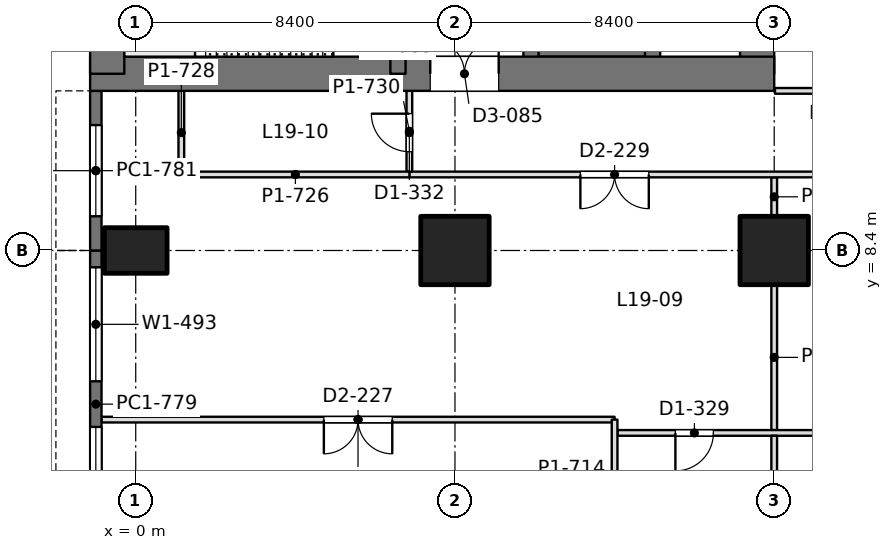
"""IFC4 building model, lengths in metres.
Left out: names, types, materials, properties, quantities, classifications, styles, units other than length and angle.
Written with IfcOpenShell. Run it as: python <this file> out.ifc"""

import sys

from ifc_helpers import new_model, si_unit, direction, frame, frame_2d, origin, origin_2d, place, context, subcontext, project, spatial, rectangle, extrude, element, fill, save


model = new_model("IFC4")
c1 = context("Model", 3, precision=1e-05, world=origin(), true_north=direction((0.0, 1.0)))
c2 = subcontext(c1, "Body", "Model", "MODEL_VIEW")
j1 = project(units=[si_unit("LENGTHUNIT", "METRE"), si_unit("PLANEANGLEUNIT", "RADIAN")], contexts=[c1])
p1 = place(None, origin())
s1 = spatial("IfcSite", under=j1, at=p1, CompositionType="ELEMENT")
p2 = place(p1, origin())
s2 = spatial("IfcBuilding", under=s1, at=p2, CompositionType="ELEMENT")
p3 = place(p2, frame((0.0, 0.0, 86.4)))
s3 = spatial("IfcBuildingStorey", under=s2, at=p3, CompositionType="ELEMENT", Elevation=86.4)
p4 = place(p3, frame((0.0, 8.4, 0.0), z_axis=(0.0, 0.0, 1.0), x_axis=(0.0, 1.0, 0.0)))
e1 = element("IfcColumn", 1, at=p4, inside=s3, PredefinedType="COLUMN", context=c2, shape_type="SweptSolid", body=[
    extrude(rectangle(XDim=1.2, YDim=1.65, at=origin_2d()), origin(), (0.0, 0.0, 1.0), 4.5),
])
for number, where, z_axis, x_axis in (
    (2, (8.4, 8.4, 0.0), (0.0, 0.0, 1.0), (1.0, 0.0, 0.0)),
    (3, (16.8, 8.4, 0.0), (0.0, 0.0, 1.0), (1.0, 0.0, 0.0)),
):
    element("IfcColumn", number, at=place(p3, frame(where, z_axis=z_axis, x_axis=x_axis)), inside=s3, PredefinedType="COLUMN", context=c2, shape_type="SweptSolid", body=[
        extrude(rectangle(XDim=1.8, YDim=1.8, at=origin_2d()), origin(), (0.0, 0.0, 1.0), 4.5),
    ])
p5 = place(p3, frame((-1.2, 13.05, 0.0), z_axis=(0.0, 0.0, 1.0), x_axis=(1.0, 0.0, 0.0)))
e4 = element("IfcWall", 4, at=p5, inside=s3, PredefinedType="SHEAR", context=c2, shape_type="SweptSolid", body=[
    extrude(rectangle(XDim=18.0, YDim=0.9, at=frame_2d((9.0, 0.0))), origin(), (0.0, 0.0, 1.0), 4.5),
])
p6 = place(p5, frame((8.95, 0.0, 0.0)))
e5 = element("IfcOpeningElement", 5, at=p6, cuts=e4, PredefinedType="OPENING", context=c2, shape_type="SweptSolid", body=[
    extrude(rectangle(XDim=1.8, YDim=2.4, at=frame_2d((0.9, 1.2))), frame((0.0, 0.46, 0.0), z_axis=(0.0, -1.0, 0.0), x_axis=(1.0, 0.0, 0.0)), (0.0, 0.0, 1.0), 0.92),
])
for number, where, z_axis, x_axis in (
    (6, (-0.75, 13.05, 0.0), (0.0, 0.0, 1.0), (0.0, 1.0, 0.0)),
    (7, (16.35, 13.05, 0.0), (0.0, 0.0, 1.0), (0.0, 1.0, 0.0)),
):
    element("IfcWall", number, at=place(p3, frame(where, z_axis=z_axis, x_axis=x_axis)), inside=s3, PredefinedType="SHEAR", context=c2, shape_type="SweptSolid", body=[
        extrude(rectangle(XDim=24.3, YDim=0.9, at=frame_2d((12.15, 0.0))), origin(), (0.0, 0.0, 1.0), 4.5),
    ])
p7 = place(p3, frame((6.9, 13.05, 0.0), z_axis=(0.0, 0.0, 1.0), x_axis=(0.0, 1.0, 0.0)))
e8 = element("IfcWall", 8, at=p7, inside=s3, PredefinedType="SHEAR", context=c2, shape_type="SweptSolid", body=[
    extrude(rectangle(XDim=24.3, YDim=0.4, at=frame_2d((12.15, 0.0))), origin(), (0.0, 0.0, 1.0), 4.5),
])
p8 = place(p7, frame((1.3, 0.0, 0.0)))
e9 = element("IfcOpeningElement", 9, at=p8, cuts=e8, PredefinedType="OPENING", context=c2, shape_type="SweptSolid", body=[
    extrude(rectangle(XDim=1.0, YDim=2.2, at=frame_2d((0.5, 1.1))), frame((0.0, 0.21, 0.0), z_axis=(0.0, -1.0, 0.0), x_axis=(1.0, 0.0, 0.0)), (0.0, 0.0, 1.0), 0.42),
])
p9 = place(p7, frame((22.0, 0.0, 0.0)))
e10 = element("IfcOpeningElement", 10, at=p9, cuts=e8, PredefinedType="OPENING", context=c2, shape_type="SweptSolid", body=[
    extrude(rectangle(XDim=1.0, YDim=2.2, at=frame_2d((0.5, 1.1))), frame((0.0, 0.21, 0.0), z_axis=(0.0, -1.0, 0.0), x_axis=(1.0, 0.0, 0.0)), (0.0, 0.0, 1.0), 0.42),
])
p10 = place(p7, frame((5.55, 0.0, 0.0)))
e11 = element("IfcOpeningElement", 11, at=p10, cuts=e8, PredefinedType="OPENING", context=c2, shape_type="SweptSolid", body=[
    extrude(rectangle(XDim=1.0, YDim=2.2, at=frame_2d((0.5, 1.1))), frame((0.0, 0.21, 0.0), z_axis=(0.0, -1.0, 0.0), x_axis=(1.0, 0.0, 0.0)), (0.0, 0.0, 1.0), 0.42),
])
p11 = place(p7, frame((9.55, 0.0, 0.0)))
e12 = element("IfcOpeningElement", 12, at=p11, cuts=e8, PredefinedType="OPENING", context=c2, shape_type="SweptSolid", body=[
    extrude(rectangle(XDim=1.0, YDim=2.2, at=frame_2d((0.5, 1.1))), frame((0.0, 0.21, 0.0), z_axis=(0.0, -1.0, 0.0), x_axis=(1.0, 0.0, 0.0)), (0.0, 0.0, 1.0), 0.42),
])
p12 = place(p7, frame((12.8, 0.0, 0.0)))
e13 = element("IfcOpeningElement", 13, at=p12, cuts=e8, PredefinedType="OPENING", context=c2, shape_type="SweptSolid", body=[
    extrude(rectangle(XDim=1.1, YDim=2.2, at=frame_2d((0.55, 1.1))), frame((0.0, 0.21, 0.0), z_axis=(0.0, -1.0, 0.0), x_axis=(1.0, 0.0, 0.0)), (0.0, 0.0, 1.0), 0.42),
])
p13 = place(p7, frame((15.538, 0.0, 0.0)))
e14 = element("IfcOpeningElement", 14, at=p13, cuts=e8, PredefinedType="OPENING", context=c2, shape_type="SweptSolid", body=[
    extrude(rectangle(XDim=1.1, YDim=2.2, at=frame_2d((0.55, 1.1))), frame((0.0, 0.21, 0.0), z_axis=(0.0, -1.0, 0.0), x_axis=(1.0, 0.0, 0.0)), (0.0, 0.0, 1.0), 0.42),
])
p14 = place(p7, frame((18.262, 0.0, 0.0)))
e15 = element("IfcOpeningElement", 15, at=p14, cuts=e8, PredefinedType="OPENING", context=c2, shape_type="SweptSolid", body=[
    extrude(rectangle(XDim=1.1, YDim=2.2, at=frame_2d((0.55, 1.1))), frame((0.0, 0.21, 0.0), z_axis=(0.0, -1.0, 0.0), x_axis=(1.0, 0.0, 0.0)), (0.0, 0.0, 1.0), 0.42),
])
p15 = place(p3, frame((10.4, 13.05, 0.0), z_axis=(0.0, 0.0, 1.0), x_axis=(0.0, 1.0, 0.0)))
e16 = element("IfcWall", 16, at=p15, inside=s3, PredefinedType="SHEAR", context=c2, shape_type="SweptSolid", body=[
    extrude(rectangle(XDim=24.3, YDim=0.4, at=frame_2d((12.15, 0.0))), origin(), (0.0, 0.0, 1.0), 4.5),
])
p16 = place(p15, frame((1.5, 0.0, 0.0)))
e17 = element("IfcOpeningElement", 17, at=p16, cuts=e16, PredefinedType="OPENING", context=c2, shape_type="SweptSolid", body=[
    extrude(rectangle(XDim=1.1, YDim=2.2, at=frame_2d((0.55, 1.1))), frame((0.0, 0.21, 0.0), z_axis=(0.0, -1.0, 0.0), x_axis=(1.0, 0.0, 0.0)), (0.0, 0.0, 1.0), 0.42),
])
p17 = place(p15, frame((4.35, 0.0, 0.0)))
e18 = element("IfcOpeningElement", 18, at=p17, cuts=e16, PredefinedType="OPENING", context=c2, shape_type="SweptSolid", body=[
    extrude(rectangle(XDim=1.1, YDim=2.2, at=frame_2d((0.55, 1.1))), frame((0.0, 0.21, 0.0), z_axis=(0.0, -1.0, 0.0), x_axis=(1.0, 0.0, 0.0)), (0.0, 0.0, 1.0), 0.42),
])
p18 = place(p15, frame((7.2, 0.0, 0.0)))
e19 = element("IfcOpeningElement", 19, at=p18, cuts=e16, PredefinedType="OPENING", context=c2, shape_type="SweptSolid", body=[
    extrude(rectangle(XDim=1.1, YDim=2.2, at=frame_2d((0.55, 1.1))), frame((0.0, 0.21, 0.0), z_axis=(0.0, -1.0, 0.0), x_axis=(1.0, 0.0, 0.0)), (0.0, 0.0, 1.0), 0.42),
])
p19 = place(p15, frame((21.45, 0.0, 0.0)))
e20 = element("IfcOpeningElement", 20, at=p19, cuts=e16, PredefinedType="OPENING", context=c2, shape_type="SweptSolid", body=[
    extrude(rectangle(XDim=1.1, YDim=2.2, at=frame_2d((0.55, 1.1))), frame((0.0, 0.21, 0.0), z_axis=(0.0, -1.0, 0.0), x_axis=(1.0, 0.0, 0.0)), (0.0, 0.0, 1.0), 0.42),
])
p20 = place(p3, frame((13.6, 13.05, 0.0), z_axis=(0.0, 0.0, 1.0), x_axis=(0.0, 1.0, 0.0)))
e21 = element("IfcWall", 21, at=p20, inside=s3, PredefinedType="SHEAR", context=c2, shape_type="SweptSolid", body=[
    extrude(rectangle(XDim=24.3, YDim=0.4, at=frame_2d((12.15, 0.0))), origin(), (0.0, 0.0, 1.0), 4.5),
])
p21 = place(p3, frame((10.4, 13.65, 0.0), z_axis=(0.0, 0.0, 1.0), x_axis=(1.0, 0.0, 0.0)))
e22 = element("IfcWall", 22, at=p21, inside=s3, PredefinedType="SHEAR", context=c2, shape_type="SweptSolid", body=[
    extrude(rectangle(XDim=3.2, YDim=0.3, at=frame_2d((1.6, 0.0))), origin(), (0.0, 0.0, 1.0), 4.5),
])
p22 = place(p3, frame((-1.05, 0.315, 0.0), z_axis=(0.0, 0.0, 1.0), x_axis=(0.0, 1.0, 0.0)))
e23 = element("IfcWall", 23, at=p22, inside=s3, PredefinedType="SOLIDWALL", context=c2, shape_type="SweptSolid", body=[
    extrude(rectangle(XDim=8.085, YDim=0.3, at=frame_2d((4.042, 0.0))), origin(), (0.0, 0.0, 1.0), 4.3),
])
p23 = place(p22, frame((0.443, 0.0, 0.9)))
e24 = element("IfcOpeningElement", 24, at=p23, cuts=e23, PredefinedType="OPENING", context=c2, shape_type="SweptSolid", body=[
    extrude(rectangle(XDim=3.0, YDim=1.9, at=frame_2d((1.5, 0.95))), frame((0.0, 0.16, 0.0), z_axis=(0.0, -1.0, 0.0), x_axis=(1.0, 0.0, 0.0)), (0.0, 0.0, 1.0), 0.32),
])
p24 = place(p22, frame((4.643, 0.0, 0.9)))
e25 = element("IfcOpeningElement", 25, at=p24, cuts=e23, PredefinedType="OPENING", context=c2, shape_type="SweptSolid", body=[
    extrude(rectangle(XDim=3.0, YDim=1.9, at=frame_2d((1.5, 0.95))), frame((0.0, 0.16, 0.0), z_axis=(0.0, -1.0, 0.0), x_axis=(1.0, 0.0, 0.0)), (0.0, 0.0, 1.0), 0.32),
])
p25 = place(p3, frame((-1.05, 8.4, 0.0), z_axis=(0.0, 0.0, 1.0), x_axis=(0.0, 1.0, 0.0)))
e26 = element("IfcWall", 26, at=p25, inside=s3, PredefinedType="SOLIDWALL", context=c2, shape_type="SweptSolid", body=[
    extrude(rectangle(XDim=4.2, YDim=0.3, at=frame_2d((2.1, 0.0))), origin(), (0.0, 0.0, 1.0), 4.3),
])
p26 = place(p25, frame((0.9, 0.0, 0.9)))
e27 = element("IfcOpeningElement", 27, at=p26, cuts=e26, PredefinedType="OPENING", context=c2, shape_type="SweptSolid", body=[
    extrude(rectangle(XDim=2.4, YDim=1.9, at=frame_2d((1.2, 0.95))), frame((0.0, 0.16, 0.0), z_axis=(0.0, -1.0, 0.0), x_axis=(1.0, 0.0, 0.0)), (0.0, 0.0, 1.0), 0.32),
])
p27 = place(p3, frame((-0.902, 3.95, 0.0), z_axis=(0.0, 0.0, 1.0), x_axis=(1.0, 0.0, 0.0)))
e28 = element("IfcWall", 28, at=p27, inside=s3, PredefinedType="PARTITIONING", context=c2, shape_type="SweptSolid", body=[
    extrude(rectangle(XDim=13.502, YDim=0.15, at=frame_2d((6.751, 0.0))), origin(), (0.0, 0.0, 1.0), 3.6),
])
p28 = place(p27, frame((5.852, 0.0, 0.0)))
e29 = element("IfcOpeningElement", 29, at=p28, cuts=e28, PredefinedType="OPENING", context=c2, shape_type="SweptSolid", body=[
    extrude(rectangle(XDim=1.8, YDim=2.2, at=frame_2d((0.9, 1.1))), frame((0.0, 0.085, 0.0), z_axis=(0.0, -1.0, 0.0), x_axis=(1.0, 0.0, 0.0)), (0.0, 0.0, 1.0), 0.17),
])
p29 = place(p3, frame((12.674, 3.6, 0.0), z_axis=(0.0, 0.0, 1.0), x_axis=(1.0, 0.0, 0.0)))
e30 = element("IfcWall", 30, at=p29, inside=s3, PredefinedType="PARTITIONING", context=c2, shape_type="SweptSolid", body=[
    extrude(rectangle(XDim=12.526, YDim=0.15, at=frame_2d((6.263, 0.0))), origin(), (0.0, 0.0, 1.0), 3.6),
])
p30 = place(p29, frame((1.526, 0.0, 0.0)))
e31 = element("IfcOpeningElement", 31, at=p30, cuts=e30, PredefinedType="OPENING", context=c2, shape_type="SweptSolid", body=[
    extrude(rectangle(XDim=1.0, YDim=2.2, at=frame_2d((0.5, 1.1))), frame((0.0, 0.085, 0.0), z_axis=(0.0, -1.0, 0.0), x_axis=(1.0, 0.0, 0.0)), (0.0, 0.0, 1.0), 0.17),
])
p31 = place(p29, frame((5.726, 0.0, 0.0)))
e32 = element("IfcOpeningElement", 32, at=p31, cuts=e30, PredefinedType="OPENING", context=c2, shape_type="SweptSolid", body=[
    extrude(rectangle(XDim=1.0, YDim=2.2, at=frame_2d((0.5, 1.1))), frame((0.0, 0.085, 0.0), z_axis=(0.0, -1.0, 0.0), x_axis=(1.0, 0.0, 0.0)), (0.0, 0.0, 1.0), 0.17),
])
p32 = place(p29, frame((9.926, 0.0, 0.0)))
e33 = element("IfcOpeningElement", 33, at=p32, cuts=e30, PredefinedType="OPENING", context=c2, shape_type="SweptSolid", body=[
    extrude(rectangle(XDim=1.0, YDim=2.2, at=frame_2d((0.5, 1.1))), frame((0.0, 0.085, 0.0), z_axis=(0.0, -1.0, 0.0), x_axis=(1.0, 0.0, 0.0)), (0.0, 0.0, 1.0), 0.17),
])
p33 = place(p3, frame((12.6, -0.902, 0.0), z_axis=(0.0, 0.0, 1.0), x_axis=(0.0, 1.0, 0.0)))
e34 = element("IfcWall", 34, at=p33, inside=s3, PredefinedType="PARTITIONING", context=c2, shape_type="SweptSolid", body=[
    extrude(rectangle(XDim=4.852, YDim=0.15, at=frame_2d((2.426, 0.0))), origin(), (0.0, 0.0, 1.0), 3.854),
])
p34 = place(p3, frame((16.8, 0.799, 0.0), z_axis=(0.0, 0.0, 1.0), x_axis=(0.0, 1.0, 0.0)))
e35 = element("IfcWall", 35, at=p34, inside=s3, PredefinedType="PARTITIONING", context=c2, shape_type="SweptSolid", body=[
    extrude(rectangle(XDim=2.727, YDim=0.15, at=frame_2d((1.363, 0.0))), origin(), (0.0, 0.0, 1.0), 3.6),
])
p35 = place(p3, frame((16.8, 3.674, 0.0), z_axis=(0.0, 0.0, 1.0), x_axis=(0.0, 1.0, 0.0)))
e36 = element("IfcWall", 36, at=p35, inside=s3, PredefinedType="PARTITIONING", context=c2, shape_type="SweptSolid", body=[
    extrude(rectangle(XDim=3.827, YDim=0.15, at=frame_2d((1.914, 0.0))), origin(), (0.0, 0.0, 1.0), 3.6),
])
p36 = place(p3, frame((16.8, 9.299, 0.0), z_axis=(0.0, 0.0, 1.0), x_axis=(0.0, 1.0, 0.0)))
e37 = element("IfcWall", 37, at=p36, inside=s3, PredefinedType="PARTITIONING", context=c2, shape_type="SweptSolid", body=[
    extrude(rectangle(XDim=1.027, YDim=0.15, at=frame_2d((0.513, 0.0))), origin(), (0.0, 0.0, 1.0), 3.804),
])
p37 = place(p3, frame((7.198, 10.4, 0.0), z_axis=(0.0, 0.0, 1.0), x_axis=(1.0, 0.0, 0.0)))
e38 = element("IfcWall", 38, at=p37, inside=s3, PredefinedType="PARTITIONING", context=c2, shape_type="SweptSolid", body=[
    extrude(rectangle(XDim=42.002, YDim=0.15, at=frame_2d((21.001, 0.0))), origin(), (0.0, 0.0, 1.0), 3.6),
])
p38 = place(p37, frame((4.502, 0.0, 0.0)))
e39 = element("IfcOpeningElement", 39, at=p38, cuts=e38, PredefinedType="OPENING", context=c2, shape_type="SweptSolid", body=[
    extrude(rectangle(XDim=1.8, YDim=2.2, at=frame_2d((0.9, 1.1))), frame((0.0, 0.085, 0.0), z_axis=(0.0, -1.0, 0.0), x_axis=(1.0, 0.0, 0.0)), (0.0, 0.0, 1.0), 0.17),
])
p39 = place(p37, frame((12.902, 0.0, 0.0)))
e40 = element("IfcOpeningElement", 40, at=p39, cuts=e38, PredefinedType="OPENING", context=c2, shape_type="SweptSolid", body=[
    extrude(rectangle(XDim=1.8, YDim=2.2, at=frame_2d((0.9, 1.1))), frame((0.0, 0.085, 0.0), z_axis=(0.0, -1.0, 0.0), x_axis=(1.0, 0.0, 0.0)), (0.0, 0.0, 1.0), 0.17),
])
p40 = place(p37, frame((21.302, 0.0, 0.0)))
e41 = element("IfcOpeningElement", 41, at=p40, cuts=e38, PredefinedType="OPENING", context=c2, shape_type="SweptSolid", body=[
    extrude(rectangle(XDim=1.8, YDim=2.2, at=frame_2d((0.9, 1.1))), frame((0.0, 0.085, 0.0), z_axis=(0.0, -1.0, 0.0), x_axis=(1.0, 0.0, 0.0)), (0.0, 0.0, 1.0), 0.17),
])
p41 = place(p37, frame((29.702, 0.0, 0.0)))
e42 = element("IfcOpeningElement", 42, at=p41, cuts=e38, PredefinedType="OPENING", context=c2, shape_type="SweptSolid", body=[
    extrude(rectangle(XDim=1.8, YDim=2.2, at=frame_2d((0.9, 1.1))), frame((0.0, 0.085, 0.0), z_axis=(0.0, -1.0, 0.0), x_axis=(1.0, 0.0, 0.0)), (0.0, 0.0, 1.0), 0.17),
])
p42 = place(p37, frame((38.102, 0.0, 0.0)))
e43 = element("IfcOpeningElement", 43, at=p42, cuts=e38, PredefinedType="OPENING", context=c2, shape_type="SweptSolid", body=[
    extrude(rectangle(XDim=1.8, YDim=2.2, at=frame_2d((0.9, 1.1))), frame((0.0, 0.085, 0.0), z_axis=(0.0, -1.0, 0.0), x_axis=(1.0, 0.0, 0.0)), (0.0, 0.0, 1.0), 0.17),
])
p43 = place(p3, frame((7.2, 10.474, 0.0), z_axis=(0.0, 0.0, 1.0), x_axis=(0.0, 1.0, 0.0)))
e44 = element("IfcWall", 44, at=p43, inside=s3, PredefinedType="PARTITIONING", context=c2, shape_type="SweptSolid", body=[
    extrude(rectangle(XDim=2.128, YDim=0.15, at=frame_2d((1.064, 0.0))), origin(), (0.0, 0.0, 1.0), 4.3),
])
p44 = place(p43, frame((0.526, 0.0, 0.0)))
e45 = element("IfcOpeningElement", 45, at=p44, cuts=e44, PredefinedType="OPENING", context=c2, shape_type="SweptSolid", body=[
    extrude(rectangle(XDim=1.0, YDim=2.2, at=frame_2d((0.5, 1.1))), frame((0.0, 0.085, 0.0), z_axis=(0.0, -1.0, 0.0), x_axis=(1.0, 0.0, 0.0)), (0.0, 0.0, 1.0), 0.17),
])
p45 = place(p3, frame((1.2, 10.4, 0.0), z_axis=(0.0, 0.0, 1.0), x_axis=(1.0, 0.0, 0.0)))
e46 = element("IfcWall", 46, at=p45, inside=s3, PredefinedType="PARTITIONING", context=c2, shape_type="SweptSolid", body=[
    extrude(rectangle(XDim=6.002, YDim=0.15, at=frame_2d((3.001, 0.0))), origin(), (0.0, 0.0, 1.0), 4.3),
])
p46 = place(p3, frame((1.2, 10.4, 0.0), z_axis=(0.0, 0.0, 1.0), x_axis=(0.0, 1.0, 0.0)))
e47 = element("IfcWall", 47, at=p46, inside=s3, PredefinedType="PARTITIONING", context=c2, shape_type="SweptSolid", body=[
    extrude(rectangle(XDim=2.202, YDim=0.15, at=frame_2d((1.101, 0.0))), origin(), (0.0, 0.0, 1.0), 4.3),
])
p47 = place(p3, frame((16.82, 12.6, 0.0), z_axis=(0.0, 0.0, 1.0), x_axis=(1.0, 0.0, 0.0)))
e48 = element("IfcWall", 48, at=p47, inside=s3, PredefinedType="PARTITIONING", context=c2, shape_type="SweptSolid", body=[
    extrude(rectangle(XDim=16.76, YDim=0.15, at=frame_2d((8.38, 0.0))), origin(), (0.0, 0.0, 1.0), 3.6),
])
p48 = place(p47, frame((1.33, 0.0, 0.0)))
e49 = element("IfcOpeningElement", 49, at=p48, cuts=e48, PredefinedType="OPENING", context=c2, shape_type="SweptSolid", body=[
    extrude(rectangle(XDim=1.0, YDim=2.2, at=frame_2d((0.5, 1.1))), frame((0.0, 0.085, 0.0), z_axis=(0.0, -1.0, 0.0), x_axis=(1.0, 0.0, 0.0)), (0.0, 0.0, 1.0), 0.17),
])
p49 = place(p47, frame((7.83, 0.0, 0.0)))
e50 = element("IfcOpeningElement", 50, at=p49, cuts=e48, PredefinedType="OPENING", context=c2, shape_type="SweptSolid", body=[
    extrude(rectangle(XDim=1.0, YDim=2.2, at=frame_2d((0.5, 1.1))), frame((0.0, 0.085, 0.0), z_axis=(0.0, -1.0, 0.0), x_axis=(1.0, 0.0, 0.0)), (0.0, 0.0, 1.0), 0.17),
])
p50 = place(p47, frame((14.38, 0.0, 0.0)))
e51 = element("IfcOpeningElement", 51, at=p50, cuts=e48, PredefinedType="OPENING", context=c2, shape_type="SweptSolid", body=[
    extrude(rectangle(XDim=1.0, YDim=2.2, at=frame_2d((0.5, 1.1))), frame((0.0, 0.085, 0.0), z_axis=(0.0, -1.0, 0.0), x_axis=(1.0, 0.0, 0.0)), (0.0, 0.0, 1.0), 0.17),
])
p51 = place(p23, origin())
e52 = element("IfcWindow", 52, at=p51, inside=s3, PartitioningType="SINGLE_PANEL", PredefinedType="WINDOW", context=c2, shape_type="SweptSolid", body=[
    extrude(rectangle(XDim=3.0, YDim=1.9, at=frame_2d((1.5, 0.95))), frame((0.0, 0.03, 0.0), z_axis=(0.0, -1.0, 0.0), x_axis=(1.0, 0.0, 0.0)), (0.0, 0.0, 1.0), 0.06),
])
fill(e24, e52)
p52 = place(p24, origin())
e53 = element("IfcWindow", 53, at=p52, inside=s3, PartitioningType="SINGLE_PANEL", PredefinedType="WINDOW", context=c2, shape_type="SweptSolid", body=[
    extrude(rectangle(XDim=3.0, YDim=1.9, at=frame_2d((1.5, 0.95))), frame((0.0, 0.03, 0.0), z_axis=(0.0, -1.0, 0.0), x_axis=(1.0, 0.0, 0.0)), (0.0, 0.0, 1.0), 0.06),
])
fill(e25, e53)
p53 = place(p26, origin())
e54 = element("IfcWindow", 54, at=p53, inside=s3, PartitioningType="SINGLE_PANEL", PredefinedType="WINDOW", context=c2, shape_type="SweptSolid", body=[
    extrude(rectangle(XDim=2.4, YDim=1.9, at=frame_2d((1.2, 0.95))), frame((0.0, 0.03, 0.0), z_axis=(0.0, -1.0, 0.0), x_axis=(1.0, 0.0, 0.0)), (0.0, 0.0, 1.0), 0.06),
])
fill(e27, e54)
p54 = place(p6, origin())
e55 = element("IfcDoor", 55, at=p54, inside=s3, OperationType="DOUBLE_DOOR_SINGLE_SWING", PredefinedType="DOOR", context=c2, shape_type="SweptSolid", body=[
    extrude(rectangle(XDim=1.8, YDim=2.4, at=frame_2d((0.9, 1.2))), frame((0.0, 0.025, 0.0), z_axis=(0.0, -1.0, 0.0), x_axis=(1.0, 0.0, 0.0)), (0.0, 0.0, 1.0), 0.05),
])
fill(e5, e55)
p55 = place(p28, frame((1.8, 0.0, 0.0), z_axis=(0.0, 0.0, 1.0), x_axis=(-1.0, 0.0, 0.0)))
e56 = element("IfcDoor", 56, at=p55, inside=s3, OperationType="DOUBLE_DOOR_SINGLE_SWING", PredefinedType="DOOR", context=c2, shape_type="SweptSolid", body=[
    extrude(rectangle(XDim=1.8, YDim=2.2, at=frame_2d((0.9, 1.1))), frame((0.0, 0.025, 0.0), z_axis=(0.0, -1.0, 0.0), x_axis=(1.0, 0.0, 0.0)), (0.0, 0.0, 1.0), 0.05),
])
fill(e29, e56)
p56 = place(p30, frame((1.0, 0.0, 0.0), z_axis=(0.0, 0.0, 1.0), x_axis=(-1.0, 0.0, 0.0)))
e57 = element("IfcDoor", 57, at=p56, inside=s3, OperationType="SINGLE_SWING_RIGHT", PredefinedType="DOOR", context=c2, shape_type="SweptSolid", body=[
    extrude(rectangle(XDim=1.0, YDim=2.2, at=frame_2d((0.5, 1.1))), frame((0.0, 0.025, 0.0), z_axis=(0.0, -1.0, 0.0), x_axis=(1.0, 0.0, 0.0)), (0.0, 0.0, 1.0), 0.05),
])
fill(e31, e57)
p57 = place(p38, frame((1.8, 0.0, 0.0), z_axis=(0.0, 0.0, 1.0), x_axis=(-1.0, 0.0, 0.0)))
e58 = element("IfcDoor", 58, at=p57, inside=s3, OperationType="DOUBLE_DOOR_SINGLE_SWING", PredefinedType="DOOR", context=c2, shape_type="SweptSolid", body=[
    extrude(rectangle(XDim=1.8, YDim=2.2, at=frame_2d((0.9, 1.1))), frame((0.0, 0.025, 0.0), z_axis=(0.0, -1.0, 0.0), x_axis=(1.0, 0.0, 0.0)), (0.0, 0.0, 1.0), 0.05),
])
fill(e39, e58)
p58 = place(p44, origin())
e59 = element("IfcDoor", 59, at=p58, inside=s3, OperationType="SINGLE_SWING_RIGHT", PredefinedType="DOOR", context=c2, shape_type="SweptSolid", body=[
    extrude(rectangle(XDim=1.0, YDim=2.2, at=frame_2d((0.5, 1.1))), frame((0.0, 0.025, 0.0), z_axis=(0.0, -1.0, 0.0), x_axis=(1.0, 0.0, 0.0)), (0.0, 0.0, 1.0), 0.05),
])
fill(e45, e59)
save(model, sys.argv[1])
